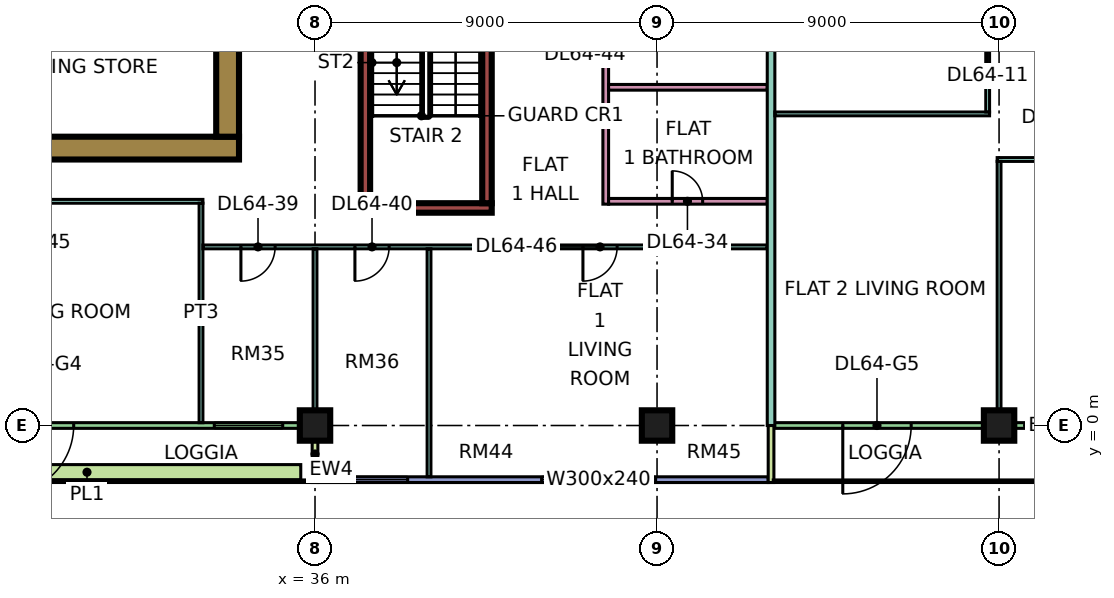
"""IFC4 building model, lengths in metres.
Left out: names, types, materials, properties, quantities, classifications, styles, units other than length and angle.
Written with IfcOpenShell. Run it as: python <this file> out.ifc"""

import sys

from ifc_helpers import new_model, si_unit, direction, frame, frame_2d, origin, origin_2d, place, context, subcontext, project, spatial, rectangle, extrude, element, fill, save


model = new_model("IFC4")
c1 = context("Model", 3, precision=1e-05, world=origin(), true_north=direction((0.0, 1.0)))
c2 = subcontext(c1, "Body", "Model", "MODEL_VIEW")
j1 = project(units=[si_unit("LENGTHUNIT", "METRE"), si_unit("PLANEANGLEUNIT", "RADIAN")], contexts=[c1])
p1 = place(None, origin())
s1 = spatial("IfcSite", under=j1, at=p1, CompositionType="ELEMENT")
p2 = place(p1, origin())
s2 = spatial("IfcBuilding", under=s1, at=p2, CompositionType="ELEMENT")
p3 = place(p2, frame((0.0, 0.0, 277.15)))
s3 = spatial("IfcBuildingStorey", under=s2, at=p3, CompositionType="ELEMENT", Elevation=277.15)
for number, where, z_axis, x_axis in (
    (1, (36.0, 0.0, 0.0), (0.0, 0.0, 1.0), (1.0, 0.0, 0.0)),
    (2, (45.0, 0.0, 0.0), (0.0, 0.0, 1.0), (1.0, 0.0, 0.0)),
    (3, (54.0, 0.0, 0.0), (0.0, 0.0, 1.0), (1.0, 0.0, 0.0)),
):
    element("IfcColumn", number, at=place(p3, frame(where, z_axis=z_axis, x_axis=x_axis)), inside=s3, PredefinedType="COLUMN", context=c2, shape_type="SweptSolid", body=[
        extrude(rectangle(XDim=0.8, YDim=0.8, at=origin_2d()), origin(), (0.0, 0.0, 1.0), 3.75),
    ])
p4 = place(p3, frame((9.0, 7.3, 0.0), z_axis=(0.0, 0.0, 1.0), x_axis=(1.0, 0.0, 0.0)))
e4 = element("IfcWall", 4, at=p4, inside=s3, PredefinedType="SHEAR", context=c2, shape_type="SweptSolid", body=[
    extrude(rectangle(XDim=25.0, YDim=0.6, at=frame_2d((12.5, 0.0))), origin(), (0.0, 0.0, 1.0), 3.75),
])
p5 = place(p3, frame((33.7, 7.6, 0.0), z_axis=(0.0, 0.0, 1.0), x_axis=(0.0, 1.0, 0.0)))
e5 = element("IfcWall", 5, at=p5, inside=s3, PredefinedType="SHEAR", context=c2, shape_type="SweptSolid", body=[
    extrude(rectangle(XDim=11.8, YDim=0.6, at=frame_2d((5.9, 0.0))), origin(), (0.0, 0.0, 1.0), 3.75),
])
p6 = place(p5, frame((5.6, 0.0, 0.0)))
e6 = element("IfcOpeningElement", 6, at=p6, cuts=e5, PredefinedType="OPENING", context=c2, shape_type="SweptSolid", body=[
    extrude(rectangle(XDim=1.8, YDim=2.4, at=frame_2d((0.9, 1.2))), frame((0.0, 0.31, 0.0), z_axis=(0.0, -1.0, 0.0), x_axis=(1.0, 0.0, 0.0)), (0.0, 0.0, 1.0), 0.62),
])
p7 = place(p3, frame((37.2, 5.725, 0.0), z_axis=(0.0, 0.0, 1.0), x_axis=(1.0, 0.0, 0.0)))
e7 = element("IfcWall", 7, at=p7, inside=s3, PredefinedType="SHEAR", context=c2, shape_type="SweptSolid", body=[
    extrude(rectangle(XDim=3.45, YDim=0.25, at=frame_2d((1.725, 0.0))), origin(), (0.0, 0.0, 1.0), 3.75),
])
for number, where, z_axis, x_axis in (
    (8, (37.325, 5.85, 0.0), (0.0, 0.0, 1.0), (0.0, 1.0, 0.0)),
    (9, (40.525, 5.85, 0.0), (0.0, 0.0, 1.0), (0.0, 1.0, 0.0)),
):
    element("IfcWall", number, at=place(p3, frame(where, z_axis=z_axis, x_axis=x_axis)), inside=s3, PredefinedType="SHEAR", context=c2, shape_type="SweptSolid", body=[
        extrude(rectangle(XDim=6.5, YDim=0.25, at=frame_2d((3.25, 0.0))), origin(), (0.0, 0.0, 1.0), 3.75),
    ])
p8 = place(p3, frame((24.075, 0.0, 0.0), z_axis=(0.0, 0.0, 1.0), x_axis=(1.0, 0.0, 0.0)))
e10 = element("IfcWall", 10, at=p8, inside=s3, PredefinedType="SOLIDWALL", context=c2, shape_type="SweptSolid", body=[
    extrude(rectangle(XDim=11.85, YDim=0.15, at=frame_2d((5.925, 0.0))), origin(), (0.0, 0.0, 1.0), 3.35),
])
p9 = place(p8, frame((3.775, 0.0, 0.0)))
e11 = element("IfcOpeningElement", 11, at=p9, cuts=e10, PredefinedType="OPENING", context=c2, shape_type="SweptSolid", body=[
    extrude(rectangle(XDim=1.8, YDim=2.4, at=frame_2d((0.9, 1.2))), frame((0.0, 0.085, 0.0), z_axis=(0.0, -1.0, 0.0), x_axis=(1.0, 0.0, 0.0)), (0.0, 0.0, 1.0), 0.17),
])
p10 = place(p8, frame((9.275, 0.0, 0.45)))
e12 = element("IfcOpeningElement", 12, at=p10, cuts=e10, PredefinedType="OPENING", context=c2, shape_type="SweptSolid", body=[
    extrude(rectangle(XDim=1.8, YDim=2.4, at=frame_2d((0.9, 1.2))), frame((0.0, 0.085, 0.0), z_axis=(0.0, -1.0, 0.0), x_axis=(1.0, 0.0, 0.0)), (0.0, 0.0, 1.0), 0.17),
])
p11 = place(p3, frame((36.0, -1.5, 0.0), z_axis=(0.0, 0.0, 1.0), x_axis=(0.0, 1.0, 0.0)))
e13 = element("IfcWall", 13, at=p11, inside=s3, PredefinedType="SOLIDWALL", context=c2, shape_type="SweptSolid", body=[
    extrude(rectangle(XDim=1.5, YDim=0.15, at=frame_2d((0.75, 0.0))), origin(), (0.0, 0.0, 1.0), 3.35),
])
p12 = place(p3, frame((36.075, -1.425, 0.0), z_axis=(0.0, 0.0, 1.0), x_axis=(1.0, 0.0, 0.0)))
e14 = element("IfcWall", 14, at=p12, inside=s3, PredefinedType="SOLIDWALL", context=c2, shape_type="SweptSolid", body=[
    extrude(rectangle(XDim=11.85, YDim=0.15, at=frame_2d((5.925, 0.0))), origin(), (0.0, 0.0, 1.0), 3.35),
])
p13 = place(p12, frame((0.562, 0.0, 0.45)))
e15 = element("IfcOpeningElement", 15, at=p13, cuts=e14, PredefinedType="OPENING", context=c2, shape_type="SweptSolid", body=[
    extrude(rectangle(XDim=1.8, YDim=2.4, at=frame_2d((0.9, 1.2))), frame((0.0, 0.085, 0.0), z_axis=(0.0, -1.0, 0.0), x_axis=(1.0, 0.0, 0.0)), (0.0, 0.0, 1.0), 0.17),
])
p14 = place(p12, frame((5.887, 0.0, 0.45)))
e16 = element("IfcOpeningElement", 16, at=p14, cuts=e14, PredefinedType="OPENING", context=c2, shape_type="SweptSolid", body=[
    extrude(rectangle(XDim=3.0, YDim=2.4, at=frame_2d((1.5, 1.2))), frame((0.0, 0.085, 0.0), z_axis=(0.0, -1.0, 0.0), x_axis=(1.0, 0.0, 0.0)), (0.0, 0.0, 1.0), 0.17),
])
p15 = place(p3, frame((48.075, 0.0, 0.0), z_axis=(0.0, 0.0, 1.0), x_axis=(1.0, 0.0, 0.0)))
e17 = element("IfcWall", 17, at=p15, inside=s3, PredefinedType="SOLIDWALL", context=c2, shape_type="SweptSolid", body=[
    extrude(rectangle(XDim=13.35, YDim=0.15, at=frame_2d((6.675, 0.0))), origin(), (0.0, 0.0, 1.0), 3.35),
])
p16 = place(p15, frame((1.812, 0.0, 0.0)))
e18 = element("IfcOpeningElement", 18, at=p16, cuts=e17, PredefinedType="OPENING", context=c2, shape_type="SweptSolid", body=[
    extrude(rectangle(XDim=1.8, YDim=2.4, at=frame_2d((0.9, 1.2))), frame((0.0, 0.085, 0.0), z_axis=(0.0, -1.0, 0.0), x_axis=(1.0, 0.0, 0.0)), (0.0, 0.0, 1.0), 0.17),
])
p17 = place(p15, frame((6.775, 0.0, 0.45)))
e19 = element("IfcOpeningElement", 19, at=p17, cuts=e17, PredefinedType="OPENING", context=c2, shape_type="SweptSolid", body=[
    extrude(rectangle(XDim=1.8, YDim=2.4, at=frame_2d((0.9, 1.2))), frame((0.0, 0.085, 0.0), z_axis=(0.0, -1.0, 0.0), x_axis=(1.0, 0.0, 0.0)), (0.0, 0.0, 1.0), 0.17),
])
p18 = place(p15, frame((9.525, 0.0, 0.45)))
e20 = element("IfcOpeningElement", 20, at=p18, cuts=e17, PredefinedType="OPENING", context=c2, shape_type="SweptSolid", body=[
    extrude(rectangle(XDim=1.8, YDim=2.4, at=frame_2d((0.9, 1.2))), frame((0.0, 0.085, 0.0), z_axis=(0.0, -1.0, 0.0), x_axis=(1.0, 0.0, 0.0)), (0.0, 0.0, 1.0), 0.17),
])
p19 = place(p3, frame((48.0, -1.5, 0.0), z_axis=(0.0, 0.0, 1.0), x_axis=(0.0, 1.0, 0.0)))
e21 = element("IfcWall", 21, at=p19, inside=s3, PredefinedType="SOLIDWALL", context=c2, shape_type="SweptSolid", body=[
    extrude(rectangle(XDim=1.5, YDim=0.15, at=frame_2d((0.75, 0.0))), origin(), (0.0, 0.0, 1.0), 3.35),
])
p20 = place(p3, frame((24.375, -1.229, 0.0), z_axis=(0.0, 0.0, 1.0), x_axis=(1.0, 0.0, 0.0)))
e22 = element("IfcWall", 22, at=p20, inside=s3, PredefinedType="SOLIDWALL", context=c2, shape_type="SweptSolid", body=[
    extrude(rectangle(XDim=11.25, YDim=0.4, at=frame_2d((5.625, 0.0))), origin(), (0.0, 0.0, 1.0), 0.7),
])
p21 = place(p3, frame((11.95, 5.9, 0.0), z_axis=(0.0, 0.0, 1.0), x_axis=(1.0, 0.0, 0.0)))
e23 = element("IfcWall", 23, at=p21, inside=s3, PredefinedType="PARTITIONING", context=c2, shape_type="SweptSolid", body=[
    extrude(rectangle(XDim=21.1, YDim=0.1, at=frame_2d((10.55, 0.0))), origin(), (0.0, 0.0, 1.0), 3.35),
])
p22 = place(p21, frame((1.1, 0.0, 0.0)))
e24 = element("IfcOpeningElement", 24, at=p22, cuts=e23, PredefinedType="OPENING", context=c2, shape_type="SweptSolid", body=[
    extrude(rectangle(XDim=0.9, YDim=2.1, at=frame_2d((0.45, 1.05))), frame((0.0, 0.06, 0.0), z_axis=(0.0, -1.0, 0.0), x_axis=(1.0, 0.0, 0.0)), (0.0, 0.0, 1.0), 0.12),
])
p23 = place(p21, frame((4.1, 0.0, 0.0)))
e25 = element("IfcOpeningElement", 25, at=p23, cuts=e23, PredefinedType="OPENING", context=c2, shape_type="SweptSolid", body=[
    extrude(rectangle(XDim=0.9, YDim=2.1, at=frame_2d((0.45, 1.05))), frame((0.0, 0.06, 0.0), z_axis=(0.0, -1.0, 0.0), x_axis=(1.0, 0.0, 0.0)), (0.0, 0.0, 1.0), 0.12),
])
p24 = place(p21, frame((7.1, 0.0, 0.0)))
e26 = element("IfcOpeningElement", 26, at=p24, cuts=e23, PredefinedType="OPENING", context=c2, shape_type="SweptSolid", body=[
    extrude(rectangle(XDim=0.9, YDim=2.1, at=frame_2d((0.45, 1.05))), frame((0.0, 0.06, 0.0), z_axis=(0.0, -1.0, 0.0), x_axis=(1.0, 0.0, 0.0)), (0.0, 0.0, 1.0), 0.12),
])
p25 = place(p21, frame((10.1, 0.0, 0.0)))
e27 = element("IfcOpeningElement", 27, at=p25, cuts=e23, PredefinedType="OPENING", context=c2, shape_type="SweptSolid", body=[
    extrude(rectangle(XDim=0.9, YDim=2.1, at=frame_2d((0.45, 1.05))), frame((0.0, 0.06, 0.0), z_axis=(0.0, -1.0, 0.0), x_axis=(1.0, 0.0, 0.0)), (0.0, 0.0, 1.0), 0.12),
])
p26 = place(p21, frame((16.1, 0.0, 0.0)))
e28 = element("IfcOpeningElement", 28, at=p26, cuts=e23, PredefinedType="OPENING", context=c2, shape_type="SweptSolid", body=[
    extrude(rectangle(XDim=0.9, YDim=2.1, at=frame_2d((0.45, 1.05))), frame((0.0, 0.06, 0.0), z_axis=(0.0, -1.0, 0.0), x_axis=(1.0, 0.0, 0.0)), (0.0, 0.0, 1.0), 0.12),
])
p27 = place(p3, frame((33.0, 0.074, 0.0), z_axis=(0.0, 0.0, 1.0), x_axis=(0.0, 1.0, 0.0)))
e29 = element("IfcWall", 29, at=p27, inside=s3, PredefinedType="PARTITIONING", context=c2, shape_type="SweptSolid", body=[
    extrude(rectangle(XDim=5.776, YDim=0.1, at=frame_2d((2.888, 0.0))), origin(), (0.0, 0.0, 1.0), 3.35),
])
p28 = place(p3, frame((33.05, 4.7, 0.0), z_axis=(0.0, 0.0, 1.0), x_axis=(1.0, 0.0, 0.0)))
e30 = element("IfcWall", 30, at=p28, inside=s3, PredefinedType="PARTITIONING", context=c2, shape_type="SweptSolid", body=[
    extrude(rectangle(XDim=14.85, YDim=0.1, at=frame_2d((7.425, 0.0))), origin(), (0.0, 0.0, 1.0), 3.35),
])
p29 = place(p28, frame((1.0, 0.0, 0.0)))
e31 = element("IfcOpeningElement", 31, at=p29, cuts=e30, PredefinedType="OPENING", context=c2, shape_type="SweptSolid", body=[
    extrude(rectangle(XDim=0.9, YDim=2.1, at=frame_2d((0.45, 1.05))), frame((0.0, 0.06, 0.0), z_axis=(0.0, -1.0, 0.0), x_axis=(1.0, 0.0, 0.0)), (0.0, 0.0, 1.0), 0.12),
])
p30 = place(p28, frame((4.0, 0.0, 0.0)))
e32 = element("IfcOpeningElement", 32, at=p30, cuts=e30, PredefinedType="OPENING", context=c2, shape_type="SweptSolid", body=[
    extrude(rectangle(XDim=0.9, YDim=2.1, at=frame_2d((0.45, 1.05))), frame((0.0, 0.06, 0.0), z_axis=(0.0, -1.0, 0.0), x_axis=(1.0, 0.0, 0.0)), (0.0, 0.0, 1.0), 0.12),
])
p31 = place(p28, frame((10.0, 0.0, 0.0)))
e33 = element("IfcOpeningElement", 33, at=p31, cuts=e30, PredefinedType="OPENING", context=c2, shape_type="SweptSolid", body=[
    extrude(rectangle(XDim=0.9, YDim=2.1, at=frame_2d((0.45, 1.05))), frame((0.0, 0.06, 0.0), z_axis=(0.0, -1.0, 0.0), x_axis=(1.0, 0.0, 0.0)), (0.0, 0.0, 1.0), 0.12),
])
p32 = place(p3, frame((36.0, 0.0, 0.0), z_axis=(0.0, 0.0, 1.0), x_axis=(0.0, 1.0, 0.0)))
e34 = element("IfcWall", 34, at=p32, inside=s3, PredefinedType="PARTITIONING", context=c2, shape_type="SweptSolid", body=[
    extrude(rectangle(XDim=4.65, YDim=0.1, at=frame_2d((2.325, 0.0))), origin(), (0.0, 0.0, 1.0), 3.35),
])
p33 = place(p3, frame((39.0, -1.35, 0.0), z_axis=(0.0, 0.0, 1.0), x_axis=(0.0, 1.0, 0.0)))
e35 = element("IfcWall", 35, at=p33, inside=s3, PredefinedType="PARTITIONING", context=c2, shape_type="SweptSolid", body=[
    extrude(rectangle(XDim=6.0, YDim=0.1, at=frame_2d((3.0, 0.0))), origin(), (0.0, 0.0, 1.0), 3.35),
])
p34 = place(p3, frame((43.65, 5.825, 0.0), z_axis=(0.0, 0.0, 1.0), x_axis=(0.0, 1.0, 0.0)))
e36 = element("IfcWall", 36, at=p34, inside=s3, PredefinedType="PARTITIONING", context=c2, shape_type="SweptSolid", body=[
    extrude(rectangle(XDim=6.475, YDim=0.15, at=frame_2d((3.238, 0.0))), origin(), (0.0, 0.0, 1.0), 3.35),
])
p35 = place(p34, frame((4.425, 0.0, 0.0)))
e37 = element("IfcOpeningElement", 37, at=p35, cuts=e36, PredefinedType="OPENING", context=c2, shape_type="SweptSolid", body=[
    extrude(rectangle(XDim=0.9, YDim=2.1, at=frame_2d((0.45, 1.05))), frame((0.0, 0.085, 0.0), z_axis=(0.0, -1.0, 0.0), x_axis=(1.0, 0.0, 0.0)), (0.0, 0.0, 1.0), 0.17),
])
p36 = place(p3, frame((43.725, 5.9, 0.0), z_axis=(0.0, 0.0, 1.0), x_axis=(1.0, 0.0, 0.0)))
e38 = element("IfcWall", 38, at=p36, inside=s3, PredefinedType="PARTITIONING", context=c2, shape_type="SweptSolid", body=[
    extrude(rectangle(XDim=4.175, YDim=0.15, at=frame_2d((2.087, 0.0))), origin(), (0.0, 0.0, 1.0), 3.35),
])
p37 = place(p36, frame((1.675, 0.0, 0.0)))
e39 = element("IfcOpeningElement", 39, at=p37, cuts=e38, PredefinedType="OPENING", context=c2, shape_type="SweptSolid", body=[
    extrude(rectangle(XDim=0.8, YDim=2.1, at=frame_2d((0.4, 1.05))), frame((0.0, 0.085, 0.0), z_axis=(0.0, -1.0, 0.0), x_axis=(1.0, 0.0, 0.0)), (0.0, 0.0, 1.0), 0.17),
])
p38 = place(p3, frame((43.725, 8.9, 0.0), z_axis=(0.0, 0.0, 1.0), x_axis=(1.0, 0.0, 0.0)))
e40 = element("IfcWall", 40, at=p38, inside=s3, PredefinedType="PARTITIONING", context=c2, shape_type="SweptSolid", body=[
    extrude(rectangle(XDim=4.175, YDim=0.15, at=frame_2d((2.087, 0.0))), origin(), (0.0, 0.0, 1.0), 3.35),
])
p39 = place(p3, frame((48.0, 0.0, 0.0), z_axis=(0.0, 0.0, 1.0), x_axis=(0.0, 1.0, 0.0)))
e41 = element("IfcWall", 41, at=p39, inside=s3, PredefinedType="PARTITIONING", context=c2, shape_type="SweptSolid", body=[
    extrude(rectangle(XDim=12.3, YDim=0.2, at=frame_2d((6.15, 0.0))), origin(), (0.0, 0.0, 1.0), 3.35),
])
p40 = place(p3, frame((48.1, 8.2, 0.0), z_axis=(0.0, 0.0, 1.0), x_axis=(1.0, 0.0, 0.0)))
e42 = element("IfcWall", 42, at=p40, inside=s3, PredefinedType="PARTITIONING", context=c2, shape_type="SweptSolid", body=[
    extrude(rectangle(XDim=5.65, YDim=0.1, at=frame_2d((2.825, 0.0))), origin(), (0.0, 0.0, 1.0), 3.35),
])
p41 = place(p3, frame((53.7, 8.25, 0.0), z_axis=(0.0, 0.0, 1.0), x_axis=(0.0, 1.0, 0.0)))
e43 = element("IfcWall", 43, at=p41, inside=s3, PredefinedType="PARTITIONING", context=c2, shape_type="SweptSolid", body=[
    extrude(rectangle(XDim=4.05, YDim=0.1, at=frame_2d((2.025, 0.0))), origin(), (0.0, 0.0, 1.0), 3.35),
])
p42 = place(p41, frame((1.6, 0.0, 0.0)))
e44 = element("IfcOpeningElement", 44, at=p42, cuts=e43, PredefinedType="OPENING", context=c2, shape_type="SweptSolid", body=[
    extrude(rectangle(XDim=0.9, YDim=2.1, at=frame_2d((0.45, 1.05))), frame((0.0, 0.06, 0.0), z_axis=(0.0, -1.0, 0.0), x_axis=(1.0, 0.0, 0.0)), (0.0, 0.0, 1.0), 0.12),
])
p43 = place(p3, frame((53.95, 7.0, 0.0), z_axis=(0.0, 0.0, 1.0), x_axis=(1.0, 0.0, 0.0)))
e45 = element("IfcWall", 45, at=p43, inside=s3, PredefinedType="PARTITIONING", context=c2, shape_type="SweptSolid", body=[
    extrude(rectangle(XDim=8.976, YDim=0.1, at=frame_2d((4.488, 0.0))), origin(), (0.0, 0.0, 1.0), 3.35),
])
p44 = place(p43, frame((1.1, 0.0, 0.0)))
e46 = element("IfcOpeningElement", 46, at=p44, cuts=e45, PredefinedType="OPENING", context=c2, shape_type="SweptSolid", body=[
    extrude(rectangle(XDim=0.9, YDim=2.1, at=frame_2d((0.45, 1.05))), frame((0.0, 0.06, 0.0), z_axis=(0.0, -1.0, 0.0), x_axis=(1.0, 0.0, 0.0)), (0.0, 0.0, 1.0), 0.12),
])
p45 = place(p43, frame((4.1, 0.0, 0.0)))
e47 = element("IfcOpeningElement", 47, at=p45, cuts=e45, PredefinedType="OPENING", context=c2, shape_type="SweptSolid", body=[
    extrude(rectangle(XDim=0.9, YDim=2.1, at=frame_2d((0.45, 1.05))), frame((0.0, 0.06, 0.0), z_axis=(0.0, -1.0, 0.0), x_axis=(1.0, 0.0, 0.0)), (0.0, 0.0, 1.0), 0.12),
])
p46 = place(p43, frame((7.1, 0.0, 0.0)))
e48 = element("IfcOpeningElement", 48, at=p46, cuts=e45, PredefinedType="OPENING", context=c2, shape_type="SweptSolid", body=[
    extrude(rectangle(XDim=0.9, YDim=2.1, at=frame_2d((0.45, 1.05))), frame((0.0, 0.06, 0.0), z_axis=(0.0, -1.0, 0.0), x_axis=(1.0, 0.0, 0.0)), (0.0, 0.0, 1.0), 0.12),
])
p47 = place(p3, frame((54.0, 0.074, 0.0), z_axis=(0.0, 0.0, 1.0), x_axis=(0.0, 1.0, 0.0)))
e49 = element("IfcWall", 49, at=p47, inside=s3, PredefinedType="PARTITIONING", context=c2, shape_type="SweptSolid", body=[
    extrude(rectangle(XDim=6.876, YDim=0.1, at=frame_2d((3.438, 0.0))), origin(), (0.0, 0.0, 1.0), 3.35),
])
p48 = place(p9, frame((1.8, 0.0, 0.0), z_axis=(0.0, 0.0, 1.0), x_axis=(-1.0, 0.0, 0.0)))
e50 = element("IfcDoor", 50, at=p48, inside=s3, OperationType="DOUBLE_DOOR_SINGLE_SWING", PredefinedType="DOOR", context=c2, shape_type="SweptSolid", body=[
    extrude(rectangle(XDim=1.8, YDim=2.4, at=frame_2d((0.9, 1.2))), frame((0.0, 0.025, 0.0), z_axis=(0.0, -1.0, 0.0), x_axis=(1.0, 0.0, 0.0)), (0.0, 0.0, 1.0), 0.05),
])
fill(e11, e50)
p49 = place(p10, origin())
e51 = element("IfcWindow", 51, at=p49, inside=s3, PartitioningType="SINGLE_PANEL", PredefinedType="WINDOW", context=c2, shape_type="SweptSolid", body=[
    extrude(rectangle(XDim=1.8, YDim=2.4, at=frame_2d((0.9, 1.2))), frame((0.0, 0.03, 0.0), z_axis=(0.0, -1.0, 0.0), x_axis=(1.0, 0.0, 0.0)), (0.0, 0.0, 1.0), 0.06),
])
fill(e12, e51)
p50 = place(p13, origin())
e52 = element("IfcWindow", 52, at=p50, inside=s3, PartitioningType="SINGLE_PANEL", PredefinedType="WINDOW", context=c2, shape_type="SweptSolid", body=[
    extrude(rectangle(XDim=1.8, YDim=2.4, at=frame_2d((0.9, 1.2))), frame((0.0, 0.03, 0.0), z_axis=(0.0, -1.0, 0.0), x_axis=(1.0, 0.0, 0.0)), (0.0, 0.0, 1.0), 0.06),
])
fill(e15, e52)
p51 = place(p14, origin())
e53 = element("IfcWindow", 53, at=p51, inside=s3, PartitioningType="SINGLE_PANEL", PredefinedType="WINDOW", context=c2, shape_type="SweptSolid", body=[
    extrude(rectangle(XDim=3.0, YDim=2.4, at=frame_2d((1.5, 1.2))), frame((0.0, 0.03, 0.0), z_axis=(0.0, -1.0, 0.0), x_axis=(1.0, 0.0, 0.0)), (0.0, 0.0, 1.0), 0.06),
])
fill(e16, e53)
p52 = place(p16, frame((1.8, 0.0, 0.0), z_axis=(0.0, 0.0, 1.0), x_axis=(-1.0, 0.0, 0.0)))
e54 = element("IfcDoor", 54, at=p52, inside=s3, OperationType="DOUBLE_DOOR_SINGLE_SWING", PredefinedType="DOOR", context=c2, shape_type="SweptSolid", body=[
    extrude(rectangle(XDim=1.8, YDim=2.4, at=frame_2d((0.9, 1.2))), frame((0.0, 0.025, 0.0), z_axis=(0.0, -1.0, 0.0), x_axis=(1.0, 0.0, 0.0)), (0.0, 0.0, 1.0), 0.05),
])
fill(e18, e54)
p53 = place(p17, origin())
e55 = element("IfcWindow", 55, at=p53, inside=s3, PartitioningType="SINGLE_PANEL", PredefinedType="WINDOW", context=c2, shape_type="SweptSolid", body=[
    extrude(rectangle(XDim=1.8, YDim=2.4, at=frame_2d((0.9, 1.2))), frame((0.0, 0.03, 0.0), z_axis=(0.0, -1.0, 0.0), x_axis=(1.0, 0.0, 0.0)), (0.0, 0.0, 1.0), 0.06),
])
fill(e19, e55)
p54 = place(p37, origin())
e56 = element("IfcDoor", 56, at=p54, inside=s3, OperationType="SINGLE_SWING_LEFT", PredefinedType="DOOR", context=c2, shape_type="SweptSolid", body=[
    extrude(rectangle(XDim=0.8, YDim=2.1, at=frame_2d((0.4, 1.05))), frame((0.0, 0.025, 0.0), z_axis=(0.0, -1.0, 0.0), x_axis=(1.0, 0.0, 0.0)), (0.0, 0.0, 1.0), 0.05),
])
fill(e39, e56)
p55 = place(p29, frame((0.9, 0.0, 0.0), z_axis=(0.0, 0.0, 1.0), x_axis=(-1.0, 0.0, 0.0)))
e57 = element("IfcDoor", 57, at=p55, inside=s3, OperationType="SINGLE_SWING_LEFT", PredefinedType="DOOR", context=c2, shape_type="SweptSolid", body=[
    extrude(rectangle(XDim=0.9, YDim=2.1, at=frame_2d((0.45, 1.05))), frame((0.0, 0.025, 0.0), z_axis=(0.0, -1.0, 0.0), x_axis=(1.0, 0.0, 0.0)), (0.0, 0.0, 1.0), 0.05),
])
fill(e31, e57)
p56 = place(p30, frame((0.9, 0.0, 0.0), z_axis=(0.0, 0.0, 1.0), x_axis=(-1.0, 0.0, 0.0)))
e58 = element("IfcDoor", 58, at=p56, inside=s3, OperationType="SINGLE_SWING_LEFT", PredefinedType="DOOR", context=c2, shape_type="SweptSolid", body=[
    extrude(rectangle(XDim=0.9, YDim=2.1, at=frame_2d((0.45, 1.05))), frame((0.0, 0.025, 0.0), z_axis=(0.0, -1.0, 0.0), x_axis=(1.0, 0.0, 0.0)), (0.0, 0.0, 1.0), 0.05),
])
fill(e32, e58)
p57 = place(p31, frame((0.9, 0.0, 0.0), z_axis=(0.0, 0.0, 1.0), x_axis=(-1.0, 0.0, 0.0)))
e59 = element("IfcDoor", 59, at=p57, inside=s3, OperationType="SINGLE_SWING_LEFT", PredefinedType="DOOR", context=c2, shape_type="SweptSolid", body=[
    extrude(rectangle(XDim=0.9, YDim=2.1, at=frame_2d((0.45, 1.05))), frame((0.0, 0.025, 0.0), z_axis=(0.0, -1.0, 0.0), x_axis=(1.0, 0.0, 0.0)), (0.0, 0.0, 1.0), 0.05),
])
fill(e33, e59)
save(model, sys.argv[1])
